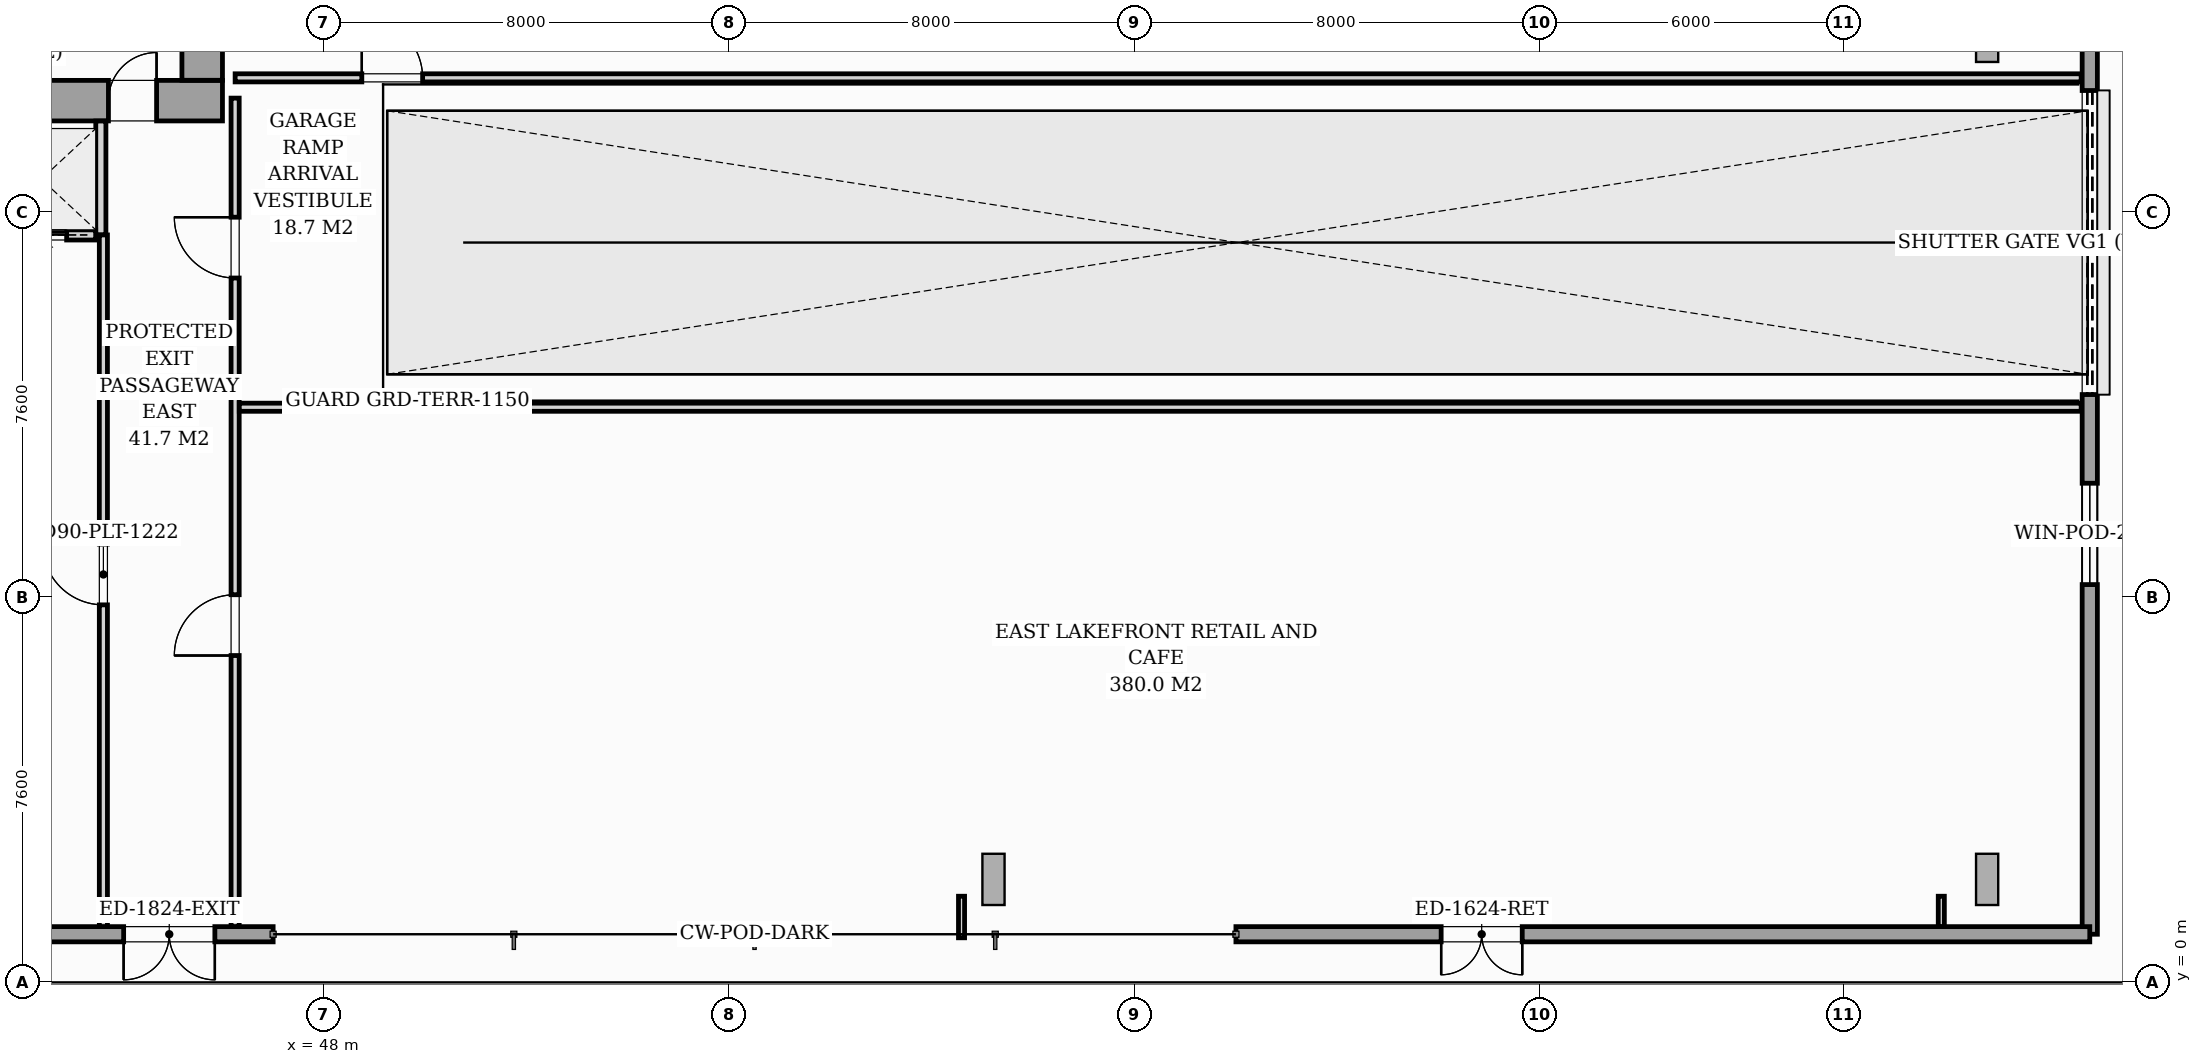
"""IFC4 building model, lengths in metres.
Left out: names, types, materials, properties, quantities, classifications, styles, units other than length and angle.
Written with IfcOpenShell. Run it as: python <this file> out.ifc"""

import sys

from ifc_helpers import new_model, si_unit, direction, frame, frame_2d, origin, origin_2d, place, context, subcontext, project, spatial, rectangle, i_section, extrude, source, transform, mapped, element, fill, save


model = new_model("IFC4")
c1 = context("Model", 3, precision=1e-05, world=origin(), true_north=direction((0.0, 1.0)))
c2 = subcontext(c1, "Body", "Model", "MODEL_VIEW")
j1 = project(units=[si_unit("LENGTHUNIT", "METRE"), si_unit("PLANEANGLEUNIT", "RADIAN")], contexts=[c1])
p1 = place(None, origin())
s1 = spatial("IfcSite", under=j1, at=p1, CompositionType="ELEMENT")
p2 = place(p1, origin())
s2 = spatial("IfcBuilding", under=s1, at=p2, CompositionType="ELEMENT")
p3 = place(p2, origin())
s3 = spatial("IfcBuildingStorey", under=s2, at=p3, CompositionType="ELEMENT", Elevation=0.0)
m1 = source(origin(), c2, "Body", "SweptSolid", [
    extrude(i_section(OverallWidth=0.437, OverallDepth=0.514, WebThickness=0.061, FlangeThickness=0.097, FilletRadius=0.018, at=origin_2d()), origin(), (0.0, 0.0, 1.0), 4.996),
])
p4 = place(p3, frame((45.6, 17.4, 0.002), z_axis=(0.0, 0.0, 1.0), x_axis=(1.0, 0.0, 0.0)))
e1 = element("IfcColumn", 1, at=p4, inside=s3, PredefinedType="PILASTER", context=c2, shape_type="MappedRepresentation", body=[
    mapped(m1, transform((0.0, 0.0, 0.0), scale=1.0)),
])
m2 = source(origin(), c2, "Body", "SweptSolid", [
    extrude(i_section(OverallWidth=0.438, OverallDepth=1.011, WebThickness=0.041, FlangeThickness=0.074, FilletRadius=0.024, at=origin_2d()), origin(), (0.0, 0.0, 1.0), 5.014),
])
p5 = place(p3, frame((61.84, 1.985, 0.122), z_axis=(-0.500449971468, 0.03778818506, 0.864940390505), x_axis=(0.862485146593, -0.065124887979, 0.501874606722)))
e2 = element("IfcColumn", 2, at=p5, inside=s3, PredefinedType="COLUMN", context=c2, shape_type="MappedRepresentation", body=[
    mapped(m2, transform((0.0, 0.0, 0.0), scale=1.0)),
])
m3 = source(origin(), c2, "Body", "SweptSolid", [
    extrude(i_section(OverallWidth=0.438, OverallDepth=1.011, WebThickness=0.041, FlangeThickness=0.074, FilletRadius=0.024, at=origin_2d()), origin(), (0.0, 0.0, 1.0), 5.56),
])
p6 = place(p3, frame((81.694, 1.987, 0.152), z_axis=(-0.638171672387, 0.033592605063, 0.769160876181), x_axis=(0.768097472559, -0.04043174613, 0.639055198361)))
e3 = element("IfcColumn", 3, at=p6, inside=s3, PredefinedType="COLUMN", context=c2, shape_type="MappedRepresentation", body=[
    mapped(m3, transform((0.0, 0.0, 0.0), scale=1.0)),
])
m4 = source(origin(), c2, "Body", "SweptSolid", [
    extrude(i_section(OverallWidth=0.438, OverallDepth=1.011, WebThickness=0.041, FlangeThickness=0.074, FilletRadius=0.024, at=origin_2d()), origin(), (0.0, 0.0, 1.0), 5.575),
])
p7 = place(p3, frame((81.694, 18.783, 0.152), z_axis=(-0.636293391775, -0.083735492124, 0.766889227295), x_axis=(0.760333659123, 0.100059051294, 0.641779489434)))
e4 = element("IfcColumn", 4, at=p7, inside=s3, PredefinedType="COLUMN", context=c2, shape_type="MappedRepresentation", body=[
    mapped(m4, transform((0.0, 0.0, 0.0), scale=1.0)),
])
p8 = place(p3, frame((82.85, 36.65, 0.0), z_axis=(0.0, 0.0, 1.0), x_axis=(0.0, -1.0, 0.0)))
e5 = element("IfcWall", 5, at=p8, inside=s3, PredefinedType="STANDARD", context=c2, shape_type="SweptSolid", body=[
    extrude(rectangle(XDim=35.7, YDim=0.3, at=frame_2d((17.85, 0.0))), origin(), (0.0, 0.0, 1.0), 4.58),
])
p9 = place(p8, frame((11.55, 0.0, 0.0)))
e6 = element("IfcOpeningElement", 6, at=p9, cuts=e5, PredefinedType="OPENING", context=c2, shape_type="SweptSolid", body=[
    extrude(rectangle(XDim=3.6, YDim=3.8, at=frame_2d((1.8, 1.9))), frame((0.0, 0.16, 0.0), z_axis=(0.0, -1.0, 0.0), x_axis=(1.0, 0.0, 0.0)), (0.0, 0.0, 1.0), 0.32),
])
p10 = place(p8, frame((19.05, 0.0, 0.0)))
e7 = element("IfcOpeningElement", 7, at=p10, cuts=e5, PredefinedType="OPENING", context=c2, shape_type="SweptSolid", body=[
    extrude(rectangle(XDim=6.0, YDim=3.2, at=frame_2d((3.0, 1.6))), frame((0.0, 0.16, 0.0), z_axis=(0.0, -1.0, 0.0), x_axis=(1.0, 0.0, 0.0)), (0.0, 0.0, 1.0), 0.32),
])
p11 = place(p8, frame((26.8, 0.0, 0.9)))
e8 = element("IfcOpeningElement", 8, at=p11, cuts=e5, PredefinedType="OPENING", context=c2, shape_type="SweptSolid", body=[
    extrude(rectangle(XDim=2.0, YDim=2.4, at=frame_2d((1.0, 1.2))), frame((0.0, 0.16, 0.0), z_axis=(0.0, -1.0, 0.0), x_axis=(1.0, 0.0, 0.0)), (0.0, 0.0, 1.0), 0.32),
])
p12 = place(p3, frame((82.85, 0.95, 0.0), z_axis=(0.0, 0.0, 1.0), x_axis=(-1.0, 0.0, 0.0)))
e9 = element("IfcWall", 9, at=p12, inside=s3, PredefinedType="STANDARD", context=c2, shape_type="SweptSolid", body=[
    extrude(rectangle(XDim=16.85, YDim=0.3, at=frame_2d((8.425, 0.0))), origin(), (0.0, 0.0, 1.0), 4.58),
])
p13 = place(p12, frame((11.2, 0.0, 0.0)))
e10 = element("IfcOpeningElement", 10, at=p13, cuts=e9, PredefinedType="OPENING", context=c2, shape_type="SweptSolid", body=[
    extrude(rectangle(XDim=1.6, YDim=2.4, at=frame_2d((0.8, 1.2))), frame((0.0, 0.16, 0.0), z_axis=(0.0, -1.0, 0.0), x_axis=(1.0, 0.0, 0.0)), (0.0, 0.0, 1.0), 0.32),
])
p14 = place(p3, frame((47.0, 0.95, 0.0), z_axis=(0.0, 0.0, 1.0), x_axis=(-1.0, 0.0, 0.0)))
e11 = element("IfcWall", 11, at=p14, inside=s3, PredefinedType="STANDARD", context=c2, shape_type="SweptSolid", body=[
    extrude(rectangle(XDim=29.0, YDim=0.3, at=frame_2d((14.5, 0.0))), origin(), (0.0, 0.0, 1.0), 4.58),
])
p15 = place(p14, frame((1.15, 0.0, 0.0)))
e12 = element("IfcOpeningElement", 12, at=p15, cuts=e11, PredefinedType="OPENING", context=c2, shape_type="SweptSolid", body=[
    extrude(rectangle(XDim=1.8, YDim=2.4, at=frame_2d((0.9, 1.2))), frame((0.0, 0.16, 0.0), z_axis=(0.0, -1.0, 0.0), x_axis=(1.0, 0.0, 0.0)), (0.0, 0.0, 1.0), 0.32),
])
p16 = place(p14, frame((9.2, 0.0, 0.0)))
e13 = element("IfcOpeningElement", 13, at=p16, cuts=e11, PredefinedType="OPENING", context=c2, shape_type="SweptSolid", body=[
    extrude(rectangle(XDim=1.8, YDim=2.4, at=frame_2d((0.9, 1.2))), frame((0.0, 0.16, 0.0), z_axis=(0.0, -1.0, 0.0), x_axis=(1.0, 0.0, 0.0)), (0.0, 0.0, 1.0), 0.32),
])
p17 = place(p14, frame((11.3, 0.0, 0.65)))
e14 = element("IfcOpeningElement", 14, at=p17, cuts=e11, PredefinedType="OPENING", context=c2, shape_type="SweptSolid", body=[
    extrude(rectangle(XDim=2.0, YDim=2.4, at=frame_2d((1.0, 1.2))), frame((0.0, 0.16, 0.0), z_axis=(0.0, -1.0, 0.0), x_axis=(1.0, 0.0, 0.0)), (0.0, 0.0, 1.0), 0.32),
])
p18 = place(p14, frame((13.6, 0.0, 0.0)))
e15 = element("IfcOpeningElement", 15, at=p18, cuts=e11, PredefinedType="OPENING", context=c2, shape_type="SweptSolid", body=[
    extrude(rectangle(XDim=1.8, YDim=2.4, at=frame_2d((0.9, 1.2))), frame((0.0, 0.16, 0.0), z_axis=(0.0, -1.0, 0.0), x_axis=(1.0, 0.0, 0.0)), (0.0, 0.0, 1.0), 0.32),
])
p19 = place(p14, frame((19.3, 0.0, 0.0)))
e16 = element("IfcOpeningElement", 16, at=p19, cuts=e11, PredefinedType="OPENING", context=c2, shape_type="SweptSolid", body=[
    extrude(rectangle(XDim=1.8, YDim=2.4, at=frame_2d((0.9, 1.2))), frame((0.0, 0.16, 0.0), z_axis=(0.0, -1.0, 0.0), x_axis=(1.0, 0.0, 0.0)), (0.0, 0.0, 1.0), 0.32),
])
p20 = place(p14, frame((26.8, 0.0, 0.0)))
e17 = element("IfcOpeningElement", 17, at=p20, cuts=e11, PredefinedType="OPENING", context=c2, shape_type="SweptSolid", body=[
    extrude(rectangle(XDim=1.0, YDim=2.2, at=frame_2d((0.5, 1.1))), frame((0.0, 0.16, 0.0), z_axis=(0.0, -1.0, 0.0), x_axis=(1.0, 0.0, 0.0)), (0.0, 0.0, 1.0), 0.32),
])
p21 = place(p3, frame((26.0, 17.4, 0.0), z_axis=(0.0, 0.0, 1.0), x_axis=(1.0, 0.0, 0.0)))
e18 = element("IfcWall", 18, at=p21, inside=s3, PredefinedType="SHEAR", context=c2, shape_type="SweptSolid", body=[
    extrude(rectangle(XDim=20.0, YDim=0.8, at=frame_2d((10.0, 0.0))), origin(), (0.0, 0.0, 1.0), 5.0),
])
p22 = place(p21, frame((1.15, 0.0, 0.0)))
e19 = element("IfcOpeningElement", 19, at=p22, cuts=e18, PredefinedType="OPENING", context=c2, shape_type="SweptSolid", body=[
    extrude(rectangle(XDim=0.95, YDim=2.06, at=frame_2d((0.475, 1.03))), frame((0.0, 0.41, 0.0), z_axis=(0.0, -1.0, 0.0), x_axis=(1.0, 0.0, 0.0)), (0.0, 0.0, 1.0), 0.82),
])
p23 = place(p21, frame((9.58, 0.0, 0.0)))
e20 = element("IfcOpeningElement", 20, at=p23, cuts=e18, PredefinedType="OPENING", context=c2, shape_type="SweptSolid", body=[
    extrude(rectangle(XDim=0.9, YDim=2.06, at=frame_2d((0.45, 1.03))), frame((0.0, 0.41, 0.0), z_axis=(0.0, -1.0, 0.0), x_axis=(1.0, 0.0, 0.0)), (0.0, 0.0, 1.0), 0.82),
])
p24 = place(p21, frame((17.75, 0.0, 0.0)))
e21 = element("IfcOpeningElement", 21, at=p24, cuts=e18, PredefinedType="OPENING", context=c2, shape_type="SweptSolid", body=[
    extrude(rectangle(XDim=0.95, YDim=2.06, at=frame_2d((0.475, 1.03))), frame((0.0, 0.41, 0.0), z_axis=(0.0, -1.0, 0.0), x_axis=(1.0, 0.0, 0.0)), (0.0, 0.0, 1.0), 0.82),
])
p25 = place(p3, frame((45.6, 17.802, 0.0), z_axis=(0.0, 0.0, 1.0), x_axis=(0.0, 1.0, 0.0)))
e22 = element("IfcWall", 22, at=p25, inside=s3, PredefinedType="SHEAR", context=c2, shape_type="SweptSolid", body=[
    extrude(rectangle(XDim=5.796, YDim=0.8, at=frame_2d((2.898, 0.0))), origin(), (0.0, 0.0, 1.0), 5.0),
])
p26 = place(p3, frame((43.6, 14.75, 0.0), z_axis=(0.0, 0.0, 1.0), x_axis=(0.0, 1.0, 0.0)))
e23 = element("IfcWall", 23, at=p26, inside=s3, PredefinedType="PARTITIONING", context=c2, shape_type="SweptSolid", body=[
    extrude(rectangle(XDim=2.248, YDim=0.2, at=frame_2d((1.124, 0.0))), origin(), (0.0, 0.0, 1.0), 4.58),
])
p27 = place(p3, frame((41.352, 14.75, 0.0), z_axis=(0.0, 0.0, 1.0), x_axis=(1.0, 0.0, 0.0)))
e24 = element("IfcWall", 24, at=p27, inside=s3, PredefinedType="PARTITIONING", context=c2, shape_type="SweptSolid", body=[
    extrude(rectangle(XDim=2.146, YDim=0.2, at=frame_2d((1.073, 0.0))), origin(), (0.0, 0.0, 1.0), 4.58),
])
p28 = place(p27, frame((0.523, 0.0, 0.0)))
e25 = element("IfcOpeningElement", 25, at=p28, cuts=e24, PredefinedType="OPENING", context=c2, shape_type="SweptSolid", body=[
    extrude(rectangle(XDim=1.05, YDim=2.08, at=frame_2d((0.525, 1.04))), frame((0.0, 0.11, 0.0), z_axis=(0.0, -1.0, 0.0), x_axis=(1.0, 0.0, 0.0)), (0.0, 0.0, 1.0), 0.22),
])
p29 = place(p3, frame((43.65, 1.102, 0.0), z_axis=(0.0, 0.0, 1.0), x_axis=(0.0, 1.0, 0.0)))
e26 = element("IfcWall", 26, at=p29, inside=s3, PredefinedType="PARTITIONING", context=c2, shape_type="SweptSolid", body=[
    extrude(rectangle(XDim=13.648, YDim=0.16, at=frame_2d((6.824, 0.0))), origin(), (0.0, 0.0, 1.0), 4.58),
])
p30 = place(p29, frame((6.348, 0.0, 0.0)))
e27 = element("IfcOpeningElement", 27, at=p30, cuts=e26, PredefinedType="OPENING", context=c2, shape_type="SweptSolid", body=[
    extrude(rectangle(XDim=1.2, YDim=2.08, at=frame_2d((0.6, 1.04))), frame((0.0, 0.09, 0.0), z_axis=(0.0, -1.0, 0.0), x_axis=(1.0, 0.0, 0.0)), (0.0, 0.0, 1.0), 0.18),
])
p31 = place(p3, frame((46.25, 1.102, 0.0), z_axis=(0.0, 0.0, 1.0), x_axis=(0.0, 1.0, 0.0)))
e28 = element("IfcWall", 28, at=p31, inside=s3, PredefinedType="PARTITIONING", context=c2, shape_type="SweptSolid", body=[
    extrude(rectangle(XDim=16.348, YDim=0.16, at=frame_2d((8.174, 0.0))), origin(), (0.0, 0.0, 1.0), 4.58),
])
p32 = place(p31, frame((5.348, 0.0, 0.0)))
e29 = element("IfcOpeningElement", 29, at=p32, cuts=e28, PredefinedType="OPENING", context=c2, shape_type="SweptSolid", body=[
    extrude(rectangle(XDim=1.2, YDim=2.08, at=frame_2d((0.6, 1.04))), frame((0.0, 0.09, 0.0), z_axis=(0.0, -1.0, 0.0), x_axis=(1.0, 0.0, 0.0)), (0.0, 0.0, 1.0), 0.18),
])
p33 = place(p31, frame((12.798, 0.0, 0.0)))
e30 = element("IfcOpeningElement", 30, at=p33, cuts=e28, PredefinedType="OPENING", context=c2, shape_type="SweptSolid", body=[
    extrude(rectangle(XDim=1.2, YDim=2.08, at=frame_2d((0.6, 1.04))), frame((0.0, 0.09, 0.0), z_axis=(0.0, -1.0, 0.0), x_axis=(1.0, 0.0, 0.0)), (0.0, 0.0, 1.0), 0.18),
])
p34 = place(p3, frame((46.332, 11.35, 0.0), z_axis=(0.0, 0.0, 1.0), x_axis=(1.0, 0.0, 0.0)))
e31 = element("IfcWall", 31, at=p34, inside=s3, PredefinedType="PARTITIONING", context=c2, shape_type="SweptSolid", body=[
    extrude(rectangle(XDim=36.348, YDim=0.16, at=frame_2d((18.174, 0.0))), origin(), (0.0, 0.0, 1.0), 4.58),
])
p35 = place(p3, frame((46.25, 17.85, 0.0), z_axis=(0.0, 0.0, 1.0), x_axis=(1.0, 0.0, 0.0)))
e32 = element("IfcWall", 32, at=p35, inside=s3, PredefinedType="PARTITIONING", context=c2, shape_type="SweptSolid", body=[
    extrude(rectangle(XDim=36.43, YDim=0.16, at=frame_2d((18.215, 0.0))), origin(), (0.0, 0.0, 1.0), 3.536),
])
p36 = place(p35, frame((2.5, 0.0, 0.0)))
e33 = element("IfcOpeningElement", 33, at=p36, cuts=e32, PredefinedType="OPENING", context=c2, shape_type="SweptSolid", body=[
    extrude(rectangle(XDim=1.2, YDim=2.08, at=frame_2d((0.6, 1.04))), frame((0.0, 0.09, 0.0), z_axis=(0.0, -1.0, 0.0), x_axis=(1.0, 0.0, 0.0)), (0.0, 0.0, 1.0), 0.18),
])
p37 = place(p3, frame((60.585, 1.7, 0.0), z_axis=(0.0, 0.0, 1.0), x_axis=(0.0, -1.0, 0.0)))
e34 = element("IfcWall", 34, at=p37, inside=s3, PredefinedType="PARTITIONING", context=c2, shape_type="SweptSolid", body=[
    extrude(rectangle(XDim=0.82, YDim=0.12, at=frame_2d((0.41, 0.0))), origin(), (0.0, 0.0, 1.0), 4.58),
])
p38 = place(p3, frame((79.92, 1.7, 0.0), z_axis=(0.0, 0.0, 1.0), x_axis=(0.0, -1.0, 0.0)))
e35 = element("IfcWall", 35, at=p38, inside=s3, PredefinedType="PARTITIONING", context=c2, shape_type="SweptSolid", body=[
    extrude(rectangle(XDim=0.598, YDim=0.12, at=frame_2d((0.299, 0.0))), origin(), (0.0, 0.0, 1.0), 4.58),
])
m5 = source(origin(), c2, "Body", "SweptSolid", [
    extrude(rectangle(XDim=6.0, YDim=3.2, at=frame_2d((3.0, 1.6))), frame((0.0, 0.025, 0.0), z_axis=(0.0, -1.0, 0.0), x_axis=(1.0, 0.0, 0.0)), (0.0, 0.0, 1.0), 0.05),
])
p39 = place(p10, origin())
e36 = element("IfcDoor", 36, at=p39, inside=s3, OperationType="ROLLINGUP", PredefinedType="GATE", context=c2, shape_type="MappedRepresentation", body=[
    mapped(m5, transform((0.0, 0.0, 0.0), scale=1.0)),
])
fill(e7, e36)
m6 = source(origin(), c2, "Body", "SweptSolid", [
    extrude(rectangle(XDim=2.0, YDim=2.4, at=frame_2d((1.0, 1.2))), frame((0.0, 0.03, 0.0), z_axis=(0.0, -1.0, 0.0), x_axis=(1.0, 0.0, 0.0)), (0.0, 0.0, 1.0), 0.06),
])
p40 = place(p11, origin())
e37 = element("IfcWindow", 37, at=p40, inside=s3, PartitioningType="SINGLE_PANEL", PredefinedType="WINDOW", context=c2, shape_type="MappedRepresentation", body=[
    mapped(m6, transform((0.0, 0.0, 0.0), scale=1.0)),
])
fill(e8, e37)
m7 = source(origin(), c2, "Body", "SweptSolid", [
    extrude(rectangle(XDim=1.6, YDim=2.4, at=frame_2d((0.8, 1.2))), frame((0.0, 0.025, 0.0), z_axis=(0.0, -1.0, 0.0), x_axis=(1.0, 0.0, 0.0)), (0.0, 0.0, 1.0), 0.05),
])
p41 = place(p13, origin())
e38 = element("IfcDoor", 38, at=p41, inside=s3, OperationType="DOUBLE_DOOR_SINGLE_SWING", PredefinedType="DOOR", context=c2, shape_type="MappedRepresentation", body=[
    mapped(m7, transform((0.0, 0.0, 0.0), scale=1.0)),
])
fill(e10, e38)
m8 = source(origin(), c2, "Body", "SweptSolid", [
    extrude(rectangle(XDim=1.8, YDim=2.4, at=frame_2d((0.9, 1.2))), frame((0.0, 0.025, 0.0), z_axis=(0.0, -1.0, 0.0), x_axis=(1.0, 0.0, 0.0)), (0.0, 0.0, 1.0), 0.05),
])
p42 = place(p15, origin())
e39 = element("IfcDoor", 39, at=p42, inside=s3, OperationType="DOUBLE_DOOR_SINGLE_SWING", PredefinedType="DOOR", context=c2, shape_type="MappedRepresentation", body=[
    mapped(m8, transform((0.0, 0.0, 0.0), scale=1.0)),
])
fill(e12, e39)
m9 = source(origin(), c2, "Body", "SweptSolid", [
    extrude(rectangle(XDim=0.95, YDim=2.06, at=frame_2d((0.475, 1.03))), frame((0.0, 0.025, 0.0), z_axis=(0.0, -1.0, 0.0), x_axis=(1.0, 0.0, 0.0)), (0.0, 0.0, 1.0), 0.05),
])
p43 = place(p24, origin())
e40 = element("IfcDoor", 40, at=p43, inside=s3, OperationType="SINGLE_SWING_RIGHT", PredefinedType="DOOR", context=c2, shape_type="MappedRepresentation", body=[
    mapped(m9, transform((0.0, 0.0, 0.0), scale=1.0)),
])
fill(e21, e40)
m10 = source(origin(), c2, "Body", "SweptSolid", [
    extrude(rectangle(XDim=1.05, YDim=2.08, at=frame_2d((0.525, 1.04))), frame((0.0, 0.025, 0.0), z_axis=(0.0, -1.0, 0.0), x_axis=(1.0, 0.0, 0.0)), (0.0, 0.0, 1.0), 0.05),
])
p44 = place(p28, origin())
e41 = element("IfcDoor", 41, at=p44, inside=s3, OperationType="SLIDING_TO_RIGHT", PredefinedType="DOOR", context=c2, shape_type="MappedRepresentation", body=[
    mapped(m10, transform((0.0, 0.0, 0.0), scale=1.0)),
])
fill(e25, e41)
m11 = source(origin(), c2, "Body", "SweptSolid", [
    extrude(rectangle(XDim=1.2, YDim=2.08, at=frame_2d((0.6, 1.04))), frame((0.0, 0.025, 0.0), z_axis=(0.0, -1.0, 0.0), x_axis=(1.0, 0.0, 0.0)), (0.0, 0.0, 1.0), 0.05),
])
p45 = place(p30, origin())
e42 = element("IfcDoor", 42, at=p45, inside=s3, OperationType="SINGLE_SWING_RIGHT", PredefinedType="DOOR", context=c2, shape_type="MappedRepresentation", body=[
    mapped(m11, transform((0.0, 0.0, 0.0), scale=1.0)),
])
fill(e27, e42)
m12 = source(origin(), c2, "Body", "SweptSolid", [
    extrude(rectangle(XDim=1.2, YDim=2.08, at=frame_2d((0.6, 1.04))), frame((0.0, 0.025, 0.0), z_axis=(0.0, -1.0, 0.0), x_axis=(1.0, 0.0, 0.0)), (0.0, 0.0, 1.0), 0.05),
])
p46 = place(p32, origin())
e43 = element("IfcDoor", 43, at=p46, inside=s3, OperationType="SINGLE_SWING_LEFT", PredefinedType="DOOR", context=c2, shape_type="MappedRepresentation", body=[
    mapped(m12, transform((0.0, 0.0, 0.0), scale=1.0)),
])
fill(e29, e43)
p47 = place(p33, origin())
e44 = element("IfcDoor", 44, at=p47, inside=s3, OperationType="SINGLE_SWING_RIGHT", PredefinedType="DOOR", context=c2, shape_type="MappedRepresentation", body=[
    mapped(m11, transform((0.0, 0.0, 0.0), scale=1.0)),
])
fill(e30, e44)
p48 = place(p36, origin())
e45 = element("IfcDoor", 45, at=p48, inside=s3, OperationType="SINGLE_SWING_LEFT", PredefinedType="DOOR", context=c2, shape_type="MappedRepresentation", body=[
    mapped(m11, transform((0.0, 0.0, 0.0), scale=1.0)),
])
fill(e33, e45)
save(model, sys.argv[1])
